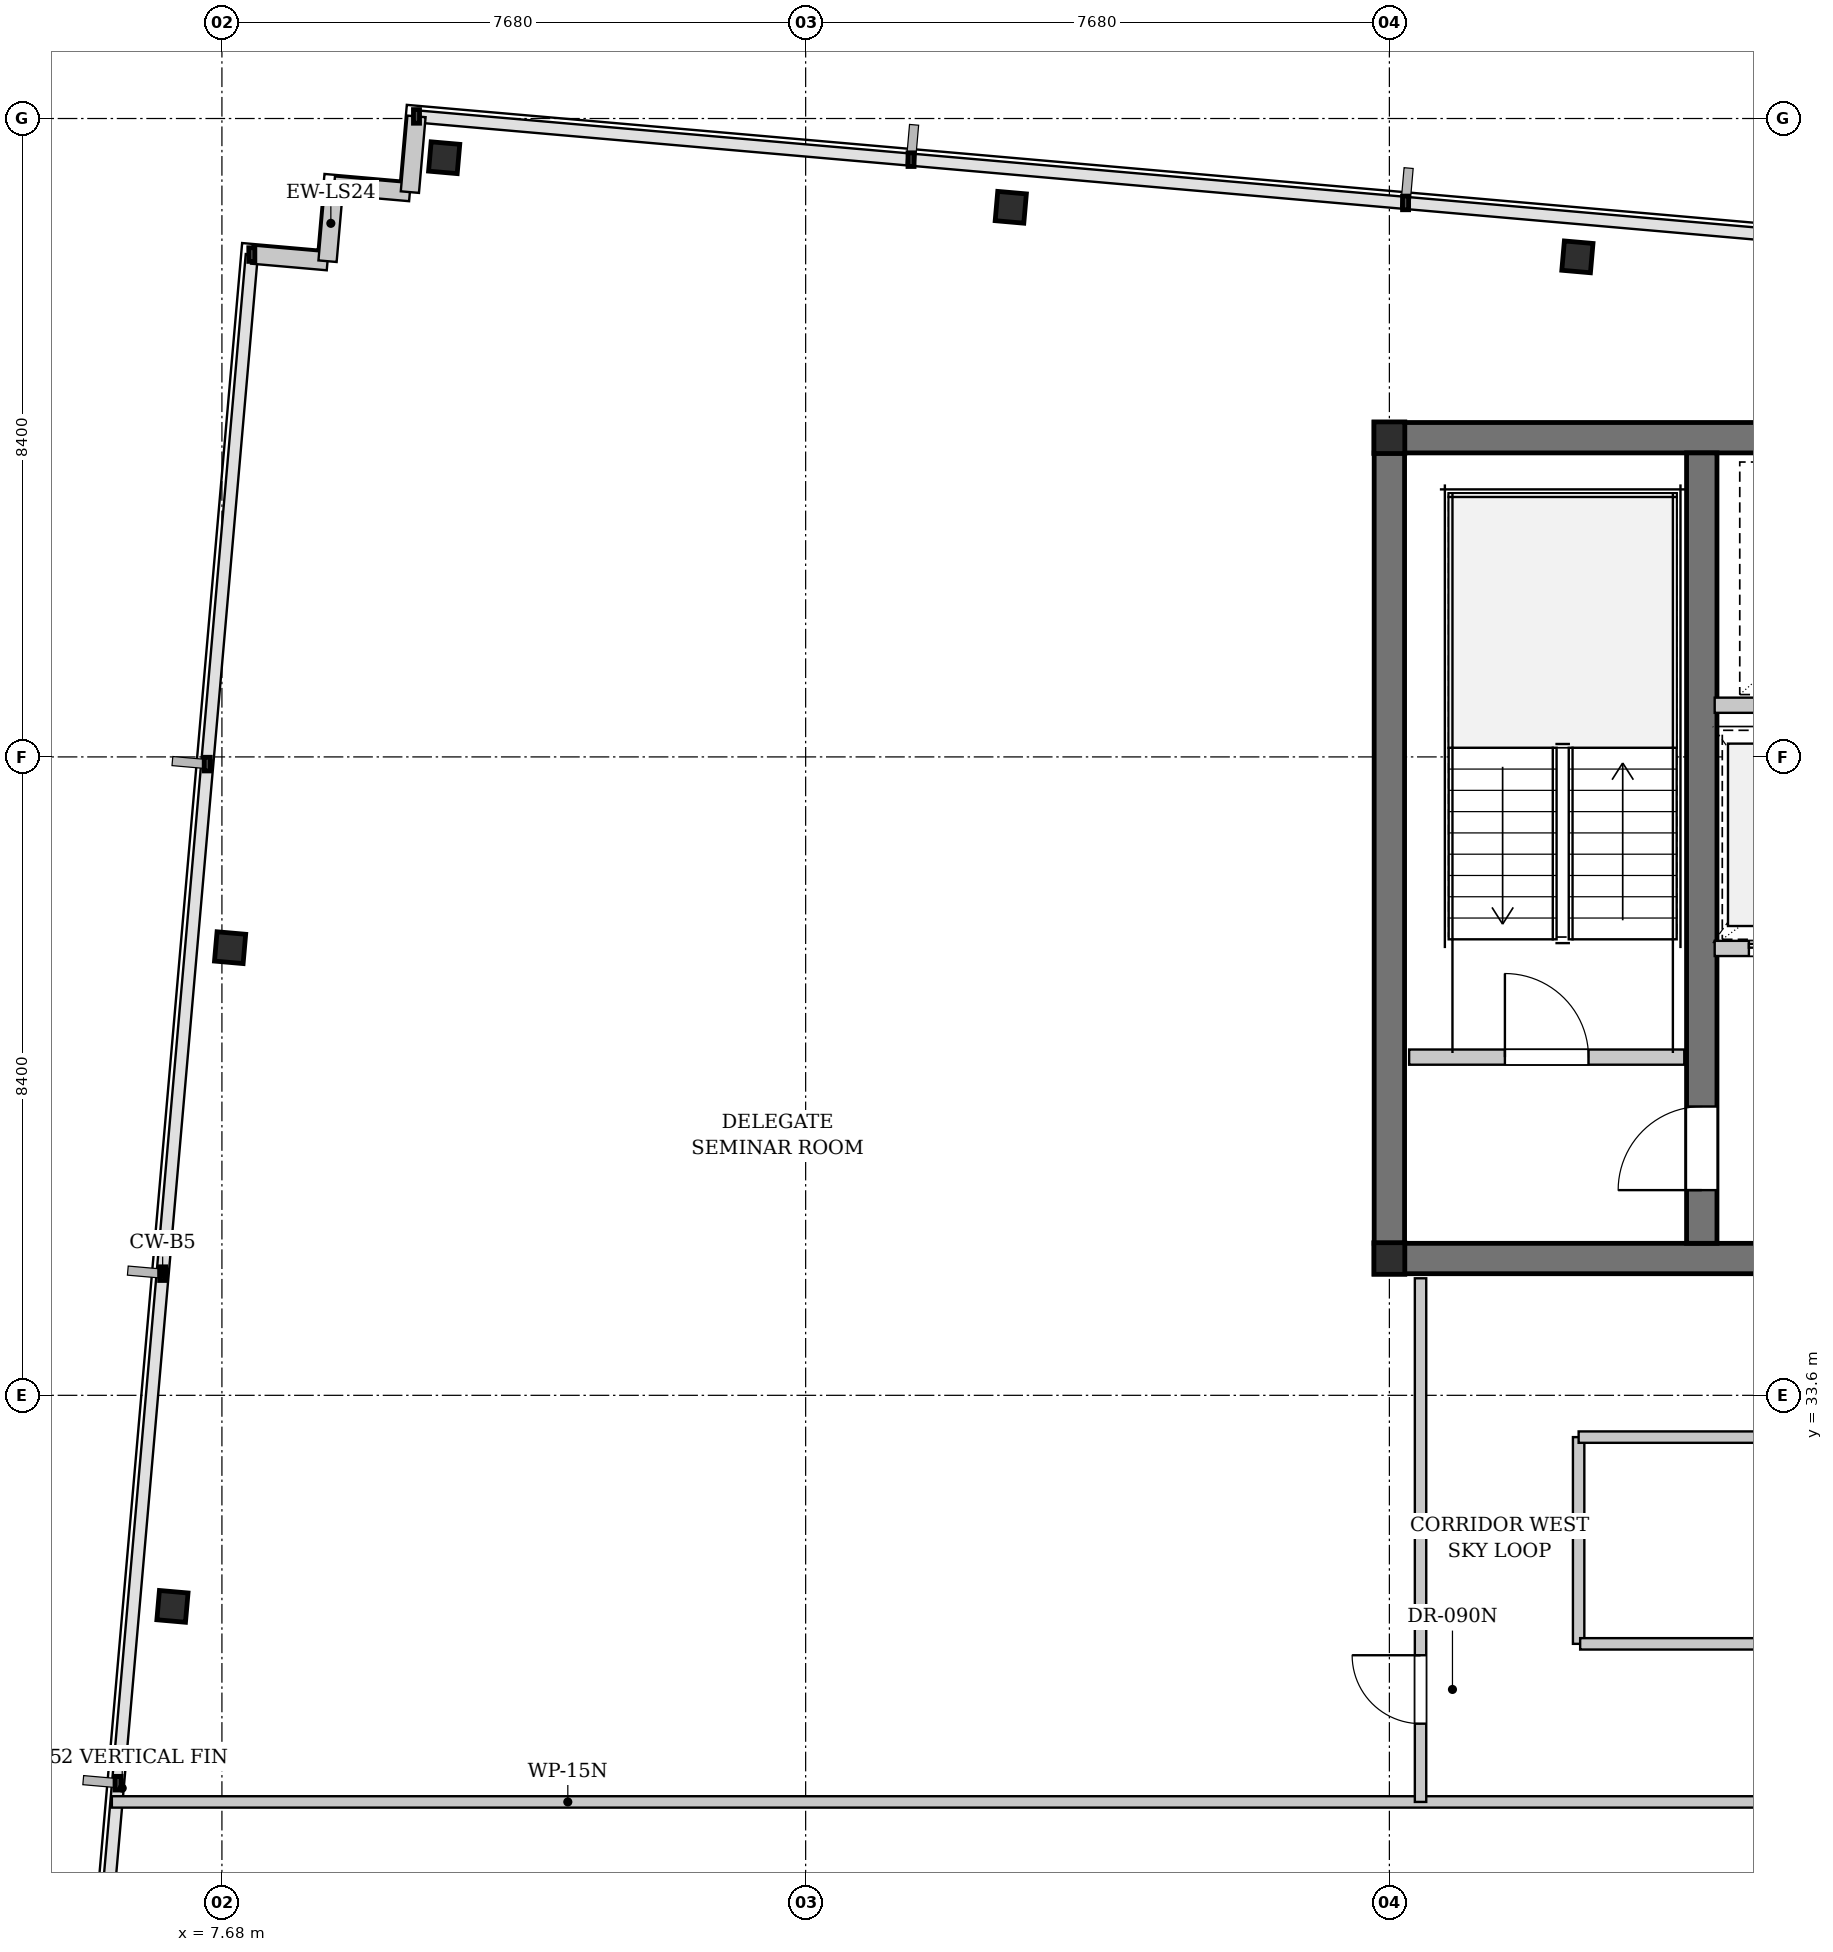
"""IFC4 building model, lengths in metres.
Left out: names, types, materials, properties, quantities, classifications, styles, units other than length and angle.
Written with IfcOpenShell. Run it as: python <this file> out.ifc"""

import sys

from ifc_helpers import new_model, si_unit, direction, frame, frame_2d, origin, origin_2d, place, context, subcontext, project, spatial, rectangle, i_section, extrude, element, fill, save


model = new_model("IFC4")
c1 = context("Model", 3, precision=1e-05, world=origin(), true_north=direction((0.0, 1.0)))
c2 = subcontext(c1, "Body", "Model", "MODEL_VIEW")
j1 = project(units=[si_unit("LENGTHUNIT", "METRE"), si_unit("PLANEANGLEUNIT", "RADIAN")], contexts=[c1])
p1 = place(None, origin())
s1 = spatial("IfcSite", under=j1, at=p1, CompositionType="ELEMENT")
p2 = place(p1, origin())
s2 = spatial("IfcBuilding", under=s1, at=p2, CompositionType="ELEMENT")
p3 = place(p2, frame((0.0, 0.0, 265.9)))
s3 = spatial("IfcBuildingStorey", under=s2, at=p3, CompositionType="ELEMENT", Elevation=265.9)
p4 = place(p3, frame((22.84, 46.2, 0.0), z_axis=(0.0, 0.0, 1.0), x_axis=(1.0, 0.0, 0.0)))
e1 = element("IfcWall", 1, at=p4, inside=s3, PredefinedType="SHEAR", context=c2, shape_type="SweptSolid", body=[
    extrude(rectangle(XDim=31.12, YDim=0.4, at=frame_2d((15.56, 0.0))), origin(), (0.0, 0.0, 1.0), 3.18),
])
p5 = place(p3, frame((22.84, 35.4, 0.0), z_axis=(0.0, 0.0, 1.0), x_axis=(1.0, 0.0, 0.0)))
e2 = element("IfcWall", 2, at=p5, inside=s3, PredefinedType="SHEAR", context=c2, shape_type="SweptSolid", body=[
    extrude(rectangle(XDim=5.36, YDim=0.4, at=frame_2d((2.68, 0.0))), origin(), (0.0, 0.0, 1.0), 3.18),
])
p6 = place(p3, frame((23.04, 35.6, 0.0), z_axis=(0.0, 0.0, 1.0), x_axis=(0.0, 1.0, 0.0)))
e3 = element("IfcWall", 3, at=p6, inside=s3, PredefinedType="SHEAR", context=c2, shape_type="SweptSolid", body=[
    extrude(rectangle(XDim=10.4, YDim=0.4, at=frame_2d((5.2, 0.0))), origin(), (0.0, 0.0, 1.0), 3.18),
])
p7 = place(p3, frame((27.15, 35.6, 0.0), z_axis=(0.0, 0.0, 1.0), x_axis=(0.0, 1.0, 0.0)))
e4 = element("IfcWall", 4, at=p7, inside=s3, PredefinedType="SHEAR", context=c2, shape_type="SweptSolid", body=[
    extrude(rectangle(XDim=10.4, YDim=0.4, at=frame_2d((5.2, 0.0))), origin(), (0.0, 0.0, 1.0), 3.18),
])
p8 = place(p7, frame((0.7, 0.0, 0.0)))
e5 = element("IfcOpeningElement", 5, at=p8, cuts=e4, PredefinedType="OPENING", context=c2, shape_type="SweptSolid", body=[
    extrude(rectangle(XDim=1.1, YDim=2.15, at=frame_2d((0.55, 1.075))), frame((0.0, 0.21, 0.0), z_axis=(0.0, -1.0, 0.0), x_axis=(1.0, 0.0, 0.0)), (0.0, 0.0, 1.0), 0.42),
])
for number, where, z_axis, x_axis in (
    (6, (23.04, 35.4, 0.0), (0.0, 0.0, 1.0), (1.0, 0.0, 0.0)),
    (7, (23.04, 46.2, 0.0), (0.0, 0.0, 1.0), (1.0, 0.0, 0.0)),
):
    element("IfcColumn", number, at=place(p3, frame(where, z_axis=z_axis, x_axis=x_axis)), inside=s3, PredefinedType="COLUMN", context=c2, shape_type="SweptSolid", body=[
        extrude(i_section(OverallWidth=0.406, OverallDepth=0.416, WebThickness=0.03, FlangeThickness=0.048, FilletRadius=0.015, at=origin_2d()), origin(), (0.0, 0.0, 1.0), 3.4),
    ])
for number, where, z_axis, x_axis in (
    (8, (10.604, 49.884, 0.0), (0.0, 0.0, 1.0), (0.996, -0.087, 0.0)),
    (9, (18.059, 49.232, 0.0), (0.0, 0.0, 1.0), (0.996, -0.087, 0.0)),
    (10, (25.514, 48.58, 0.0), (0.0, 0.0, 1.0), (0.996, -0.087, 0.0)),
    (11, (7.029, 30.823, 0.0), (0.0, 0.0, 1.0), (0.996, -0.087, 0.0)),
    (12, (7.787, 39.49, 0.0), (0.0, 0.0, 1.0), (0.996, -0.087, 0.0)),
):
    element("IfcColumn", number, at=place(p3, frame(where, z_axis=z_axis, x_axis=x_axis)), inside=s3, PredefinedType="COLUMN", context=c2, shape_type="SweptSolid", body=[
        extrude(i_section(OverallWidth=0.378, OverallDepth=0.387, WebThickness=0.021, FlangeThickness=0.033, FilletRadius=0.015, at=origin_2d()), origin(), (0.0, 0.0, 1.0), 3.4),
    ])
for number, where, z_axis, x_axis in (
    (13, (8.073, 48.61, 0.0), (0.0, 0.0, 1.0), (0.996, -0.087, 0.0)),
    (14, (9.07, 48.522, 0.0), (0.0, 0.0, 1.0), (0.087, 0.996, 0.0)),
):
    element("IfcWall", number, at=place(p3, frame(where, z_axis=z_axis, x_axis=x_axis)), inside=s3, PredefinedType="SOLIDWALL", context=c2, shape_type="SweptSolid", body=[
        extrude(rectangle(XDim=1.0, YDim=0.24, at=frame_2d((0.5, 0.0))), origin(), (0.0, 0.0, 1.0), 3.18),
    ])
for number, where, z_axis, x_axis in (
    (15, (9.157, 49.519, 0.0), (0.0, 0.0, 1.0), (0.996, -0.087, 0.0)),
    (16, (10.153, 49.432, 0.0), (0.0, 0.0, 1.0), (0.087, 0.996, 0.0)),
):
    element("IfcWall", number, at=place(p3, frame(where, z_axis=z_axis, x_axis=x_axis)), inside=s3, PredefinedType="SOLIDWALL", context=c2, shape_type="SweptSolid", body=[
        extrude(rectangle(XDim=1.0, YDim=0.24, at=frame_2d((0.5, 0.0))), origin(), (0.0, 0.0, 1.0), 3.18),
    ])
p9 = place(p3, frame((23.3, 38.05, 0.0), z_axis=(0.0, 0.0, 1.0), x_axis=(1.0, 0.0, 0.0)))
e17 = element("IfcWall", 17, at=p9, inside=s3, PredefinedType="PARTITIONING", context=c2, shape_type="SweptSolid", body=[
    extrude(rectangle(XDim=3.62, YDim=0.2, at=frame_2d((1.81, 0.0))), origin(), (0.0, 0.0, 1.0), 3.18),
])
p10 = place(p9, frame((1.26, 0.0, 0.0)))
e18 = element("IfcOpeningElement", 18, at=p10, cuts=e17, PredefinedType="OPENING", context=c2, shape_type="SweptSolid", body=[
    extrude(rectangle(XDim=1.1, YDim=2.15, at=frame_2d((0.55, 1.075))), frame((0.0, 0.11, 0.0), z_axis=(0.0, -1.0, 0.0), x_axis=(1.0, 0.0, 0.0)), (0.0, 0.0, 1.0), 0.22),
])
p11 = place(p3, frame((27.32, 39.48, 0.0), z_axis=(0.0, 0.0, 1.0), x_axis=(1.0, 0.0, 0.0)))
e19 = element("IfcWall", 19, at=p11, inside=s3, PredefinedType="PARTITIONING", context=c2, shape_type="SweptSolid", body=[
    extrude(rectangle(XDim=3.94, YDim=0.2, at=frame_2d((1.97, 0.0))), origin(), (0.0, 0.0, 1.0), 3.18),
])
p12 = place(p11, frame((0.45, 0.0, 0.0)))
e20 = element("IfcOpeningElement", 20, at=p12, cuts=e19, PredefinedType="OPENING", context=c2, shape_type="SweptSolid", body=[
    extrude(rectangle(XDim=1.1, YDim=2.2, at=frame_2d((0.55, 1.1))), frame((0.0, 0.11, 0.0), z_axis=(0.0, -1.0, 0.0), x_axis=(1.0, 0.0, 0.0)), (0.0, 0.0, 1.0), 0.22),
])
p13 = place(p11, frame((2.41, 0.0, 0.0)))
e21 = element("IfcOpeningElement", 21, at=p13, cuts=e19, PredefinedType="OPENING", context=c2, shape_type="SweptSolid", body=[
    extrude(rectangle(XDim=1.1, YDim=2.2, at=frame_2d((0.55, 1.1))), frame((0.0, 0.11, 0.0), z_axis=(0.0, -1.0, 0.0), x_axis=(1.0, 0.0, 0.0)), (0.0, 0.0, 1.0), 0.22),
])
p14 = place(p3, frame((27.32, 42.68, 0.0), z_axis=(0.0, 0.0, 1.0), x_axis=(1.0, 0.0, 0.0)))
e22 = element("IfcWall", 22, at=p14, inside=s3, PredefinedType="PARTITIONING", context=c2, shape_type="SweptSolid", body=[
    extrude(rectangle(XDim=5.33, YDim=0.2, at=frame_2d((2.665, 0.0))), origin(), (0.0, 0.0, 1.0), 3.18),
])
p15 = place(p14, frame((4.18, 0.0, 0.0)))
e23 = element("IfcOpeningElement", 23, at=p15, cuts=e22, PredefinedType="OPENING", context=c2, shape_type="SweptSolid", body=[
    extrude(rectangle(XDim=0.9, YDim=2.15, at=frame_2d((0.45, 1.075))), frame((0.0, 0.11, 0.0), z_axis=(0.0, -1.0, 0.0), x_axis=(1.0, 0.0, 0.0)), (0.0, 0.0, 1.0), 0.22),
])
p16 = place(p3, frame((6.232, 28.25, 0.0), z_axis=(0.0, 0.0, 1.0), x_axis=(1.0, 0.0, 0.0)))
e24 = element("IfcWall", 24, at=p16, inside=s3, PredefinedType="PARTITIONING", context=c2, shape_type="SweptSolid", body=[
    extrude(rectangle(XDim=27.268, YDim=0.15, at=frame_2d((13.634, 0.0))), origin(), (0.0, 0.0, 1.0), 3.18),
])
p17 = place(p16, frame((21.738, 0.0, 0.0)))
e25 = element("IfcOpeningElement", 25, at=p17, cuts=e24, PredefinedType="OPENING", context=c2, shape_type="SweptSolid", body=[
    extrude(rectangle(XDim=1.0, YDim=2.15, at=frame_2d((0.5, 1.075))), frame((0.0, 0.085, 0.0), z_axis=(0.0, -1.0, 0.0), x_axis=(1.0, 0.0, 0.0)), (0.0, 0.0, 1.0), 0.17),
])
p18 = place(p3, frame((23.45, 28.25, 0.0), z_axis=(0.0, 0.0, 1.0), x_axis=(0.0, 1.0, 0.0)))
e26 = element("IfcWall", 26, at=p18, inside=s3, PredefinedType="PARTITIONING", context=c2, shape_type="SweptSolid", body=[
    extrude(rectangle(XDim=6.89, YDim=0.15, at=frame_2d((3.445, 0.0))), origin(), (0.0, 0.0, 1.0), 3.18),
])
p19 = place(p18, frame((1.03, 0.0, 0.0)))
e27 = element("IfcOpeningElement", 27, at=p19, cuts=e26, PredefinedType="OPENING", context=c2, shape_type="SweptSolid", body=[
    extrude(rectangle(XDim=0.9, YDim=2.15, at=frame_2d((0.45, 1.075))), frame((0.0, 0.085, 0.0), z_axis=(0.0, -1.0, 0.0), x_axis=(1.0, 0.0, 0.0)), (0.0, 0.0, 1.0), 0.17),
])
p20 = place(p3, frame((25.53, 30.33, 0.0), z_axis=(0.0, 0.0, 1.0), x_axis=(0.0, 1.0, 0.0)))
e28 = element("IfcWall", 28, at=p20, inside=s3, PredefinedType="PARTITIONING", context=c2, shape_type="SweptSolid", body=[
    extrude(rectangle(XDim=2.72, YDim=0.15, at=frame_2d((1.36, 0.0))), origin(), (0.0, 0.0, 1.0), 3.18),
])
p21 = place(p3, frame((25.53, 33.05, 0.0), z_axis=(0.0, 0.0, 1.0), x_axis=(1.0, 0.0, 0.0)))
e29 = element("IfcWall", 29, at=p21, inside=s3, PredefinedType="PARTITIONING", context=c2, shape_type="SweptSolid", body=[
    extrude(rectangle(XDim=7.97, YDim=0.15, at=frame_2d((3.985, 0.0))), origin(), (0.0, 0.0, 1.0), 3.18),
])
p22 = place(p3, frame((25.55, 30.33, 0.0), z_axis=(0.0, 0.0, 1.0), x_axis=(1.0, 0.0, 0.0)))
e30 = element("IfcWall", 30, at=p22, inside=s3, PredefinedType="PARTITIONING", context=c2, shape_type="SweptSolid", body=[
    extrude(rectangle(XDim=7.94, YDim=0.15, at=frame_2d((3.97, 0.0))), origin(), (0.0, 0.0, 1.0), 3.18),
])
p23 = place(p22, frame((3.52, 0.0, 0.0)))
e31 = element("IfcOpeningElement", 31, at=p23, cuts=e30, PredefinedType="OPENING", context=c2, shape_type="SweptSolid", body=[
    extrude(rectangle(XDim=0.9, YDim=2.15, at=frame_2d((0.45, 1.075))), frame((0.0, 0.085, 0.0), z_axis=(0.0, -1.0, 0.0), x_axis=(1.0, 0.0, 0.0)), (0.0, 0.0, 1.0), 0.17),
])
p24 = place(p10, origin())
e32 = element("IfcDoor", 32, at=p24, inside=s3, OperationType="SINGLE_SWING_LEFT", PredefinedType="DOOR", context=c2, shape_type="SweptSolid", body=[
    extrude(rectangle(XDim=1.1, YDim=2.15, at=frame_2d((0.55, 1.075))), frame((0.0, 0.025, 0.0), z_axis=(0.0, -1.0, 0.0), x_axis=(1.0, 0.0, 0.0)), (0.0, 0.0, 1.0), 0.05),
])
fill(e18, e32)
p25 = place(p12, origin())
e33 = element("IfcDoor", 33, at=p25, inside=s3, OperationType="DOUBLE_DOOR_SLIDING", PredefinedType="DOOR", context=c2, shape_type="SweptSolid", body=[
    extrude(rectangle(XDim=1.1, YDim=2.2, at=frame_2d((0.55, 1.1))), frame((0.0, 0.025, 0.0), z_axis=(0.0, -1.0, 0.0), x_axis=(1.0, 0.0, 0.0)), (0.0, 0.0, 1.0), 0.05),
])
fill(e20, e33)
p26 = place(p19, origin())
e34 = element("IfcDoor", 34, at=p26, inside=s3, OperationType="SINGLE_SWING_RIGHT", PredefinedType="DOOR", context=c2, shape_type="SweptSolid", body=[
    extrude(rectangle(XDim=0.9, YDim=2.15, at=frame_2d((0.45, 1.075))), frame((0.0, 0.025, 0.0), z_axis=(0.0, -1.0, 0.0), x_axis=(1.0, 0.0, 0.0)), (0.0, 0.0, 1.0), 0.05),
])
fill(e27, e34)
p27 = place(p8, origin())
e35 = element("IfcDoor", 35, at=p27, inside=s3, OperationType="SINGLE_SWING_LEFT", PredefinedType="DOOR", context=c2, shape_type="SweptSolid", body=[
    extrude(rectangle(XDim=1.1, YDim=2.15, at=frame_2d((0.55, 1.075))), frame((0.0, 0.025, 0.0), z_axis=(0.0, -1.0, 0.0), x_axis=(1.0, 0.0, 0.0)), (0.0, 0.0, 1.0), 0.05),
])
fill(e5, e35)
save(model, sys.argv[1])
